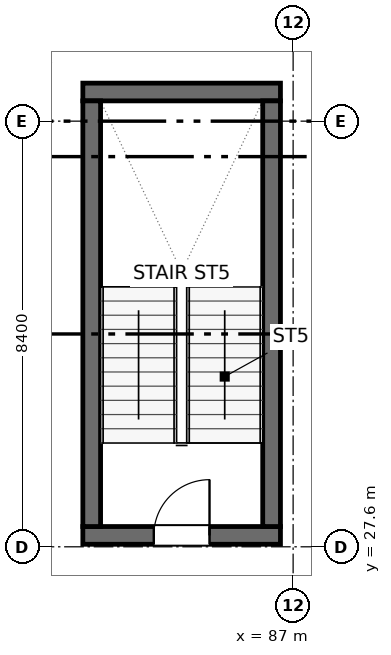
"""IFC4 building model, lengths in metres.
Left out: names, types, materials, properties, quantities, classifications, styles, units other than length and angle.
Written with IfcOpenShell. Run it as: python <this file> out.ifc"""

import sys

from ifc_helpers import new_model, si_unit, direction, frame, frame_2d, origin, place, context, subcontext, project, spatial, rectangle, extrude, element, fill, save


model = new_model("IFC4")
c1 = context("Model", 3, precision=1e-05, world=origin(), true_north=direction((0.0, 1.0)))
c2 = subcontext(c1, "Body", "Model", "MODEL_VIEW")
j1 = project(units=[si_unit("LENGTHUNIT", "METRE"), si_unit("PLANEANGLEUNIT", "RADIAN")], contexts=[c1])
p1 = place(None, origin())
s1 = spatial("IfcSite", under=j1, at=p1, CompositionType="ELEMENT")
p2 = place(p1, origin())
s2 = spatial("IfcBuilding", under=s1, at=p2, CompositionType="ELEMENT")
p3 = place(p2, frame((0.0, 0.0, 12.9)))
s3 = spatial("IfcBuildingStorey", under=s2, at=p3, CompositionType="ELEMENT", Elevation=12.9)
p4 = place(p3, frame((82.85, 27.825, 0.0), z_axis=(0.0, 0.0, 1.0), x_axis=(1.0, 0.0, 0.0)))
e1 = element("IfcWall", 1, at=p4, inside=s3, PredefinedType="SHEAR", context=c2, shape_type="SweptSolid", body=[
    extrude(rectangle(XDim=3.9, YDim=0.35, at=frame_2d((1.95, 0.0))), origin(), (0.0, 0.0, 1.0), 4.2),
])
p5 = place(p4, frame((1.4, 0.0, 0.0)))
e2 = element("IfcOpeningElement", 2, at=p5, cuts=e1, PredefinedType="OPENING", context=c2, shape_type="SweptSolid", body=[
    extrude(rectangle(XDim=1.1, YDim=2.05, at=frame_2d((0.55, 1.025))), frame((0.0, 0.185, 0.0), z_axis=(0.0, -1.0, 0.0), x_axis=(1.0, 0.0, 0.0)), (0.0, 0.0, 1.0), 0.37),
])
p6 = place(p3, frame((82.85, 36.575, 0.0), z_axis=(0.0, 0.0, 1.0), x_axis=(1.0, 0.0, 0.0)))
e3 = element("IfcWall", 3, at=p6, inside=s3, PredefinedType="SHEAR", context=c2, shape_type="SweptSolid", body=[
    extrude(rectangle(XDim=3.9, YDim=0.35, at=frame_2d((1.95, 0.0))), origin(), (0.0, 0.0, 1.0), 4.2),
])
for number, where, z_axis, x_axis in (
    (4, (83.025, 28.0, 0.0), (0.0, 0.0, 1.0), (0.0, 1.0, 0.0)),
    (5, (86.575, 28.0, 0.0), (0.0, 0.0, 1.0), (0.0, 1.0, 0.0)),
):
    element("IfcWall", number, at=place(p3, frame(where, z_axis=z_axis, x_axis=x_axis)), inside=s3, PredefinedType="SHEAR", context=c2, shape_type="SweptSolid", body=[
        extrude(rectangle(XDim=8.4, YDim=0.35, at=frame_2d((4.2, 0.0))), origin(), (0.0, 0.0, 1.0), 4.2),
    ])
p7 = place(p5, origin())
e6 = element("IfcDoor", 6, at=p7, inside=s3, OperationType="SINGLE_SWING_RIGHT", PredefinedType="DOOR", context=c2, shape_type="SweptSolid", body=[
    extrude(rectangle(XDim=1.1, YDim=2.05, at=frame_2d((0.55, 1.025))), frame((0.0, 0.025, 0.0), z_axis=(0.0, -1.0, 0.0), x_axis=(1.0, 0.0, 0.0)), (0.0, 0.0, 1.0), 0.05),
])
fill(e2, e6)
save(model, sys.argv[1])
